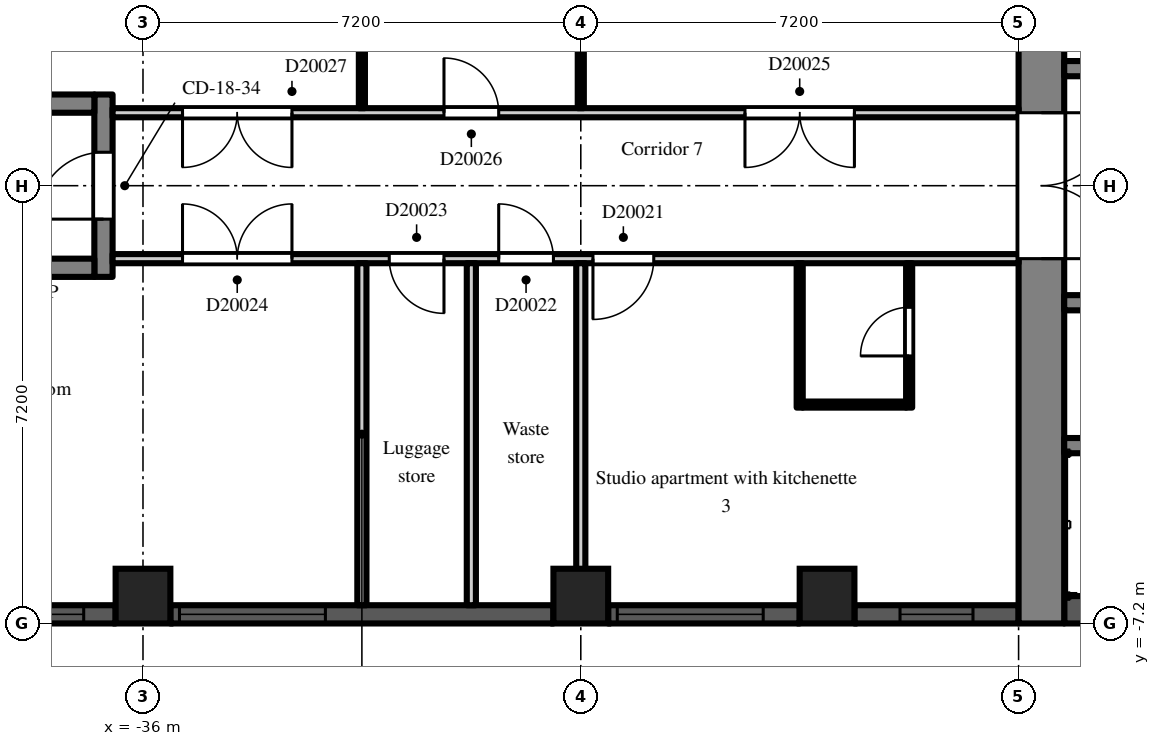
"""IFC4 building model, lengths in metres.
Left out: names, types, materials, properties, quantities, classifications, styles, units other than length and angle.
Written with IfcOpenShell. Run it as: python <this file> out.ifc"""

import sys

from ifc_helpers import new_model, si_unit, direction, frame, frame_2d, origin, origin_2d, place, context, subcontext, project, spatial, rectangle, extrude, element, fill, save


model = new_model("IFC4")
c1 = context("Model", 3, precision=1e-05, world=origin(), true_north=direction((0.0, 1.0)))
c2 = subcontext(c1, "Body", "Model", "MODEL_VIEW")
j1 = project(units=[si_unit("LENGTHUNIT", "METRE"), si_unit("PLANEANGLEUNIT", "RADIAN")], contexts=[c1])
p1 = place(None, origin())
s1 = spatial("IfcSite", under=j1, at=p1, CompositionType="ELEMENT")
p2 = place(p1, origin())
s2 = spatial("IfcBuilding", under=s1, at=p2, CompositionType="ELEMENT")
p3 = place(p2, frame((0.0, 0.0, 138.3)))
s3 = spatial("IfcBuildingStorey", under=s2, at=p3, CompositionType="ELEMENT", Elevation=138.3)
for number, where, z_axis, x_axis in (
    (1, (-36.0, -6.75, 0.0), (0.0, 0.0, 1.0), (1.0, 0.0, 0.0)),
    (2, (-28.8, -6.75, 0.0), (0.0, 0.0, 1.0), (1.0, 0.0, 0.0)),
    (3, (-24.75, -6.75, 0.0), (0.0, 0.0, 1.0), (1.0, 0.0, 0.0)),
):
    element("IfcColumn", number, at=place(p3, frame(where, z_axis=z_axis, x_axis=x_axis)), inside=s3, PredefinedType="COLUMN", context=c2, shape_type="SweptSolid", body=[
        extrude(rectangle(XDim=0.9, YDim=0.9, at=origin_2d()), origin(), (0.0, 0.0, 1.0), 3.0),
    ])
p4 = place(p3, frame((-38.7, -7.05, 0.0), z_axis=(0.0, 0.0, 1.0), x_axis=(1.0, 0.0, 0.0)))
e4 = element("IfcWall", 4, at=p4, inside=s3, PredefinedType="SOLIDWALL", context=c2, shape_type="SweptSolid", body=[
    extrude(rectangle(XDim=2.25, YDim=0.3, at=frame_2d((1.125, 0.0))), origin(), (0.0, 0.0, 1.0), 2.2),
])
p5 = place(p4, frame((0.525, 0.0, 0.2)))
e5 = element("IfcOpeningElement", 5, at=p5, cuts=e4, PredefinedType="OPENING", context=c2, shape_type="SweptSolid", body=[
    extrude(rectangle(XDim=1.2, YDim=1.85, at=frame_2d((0.6, 0.925))), frame((0.0, 0.16, 0.0), z_axis=(0.0, -1.0, 0.0), x_axis=(1.0, 0.0, 0.0)), (0.0, 0.0, 1.0), 0.32),
])
p6 = place(p3, frame((-35.55, -7.05, 0.0), z_axis=(0.0, 0.0, 1.0), x_axis=(1.0, 0.0, 0.0)))
e6 = element("IfcWall", 6, at=p6, inside=s3, PredefinedType="SOLIDWALL", context=c2, shape_type="SweptSolid", body=[
    extrude(rectangle(XDim=6.3, YDim=0.3, at=frame_2d((3.15, 0.0))), origin(), (0.0, 0.0, 1.0), 2.2),
])
p7 = place(p6, frame((0.15, 0.0, 0.2)))
e7 = element("IfcOpeningElement", 7, at=p7, cuts=e6, PredefinedType="OPENING", context=c2, shape_type="SweptSolid", body=[
    extrude(rectangle(XDim=2.4, YDim=1.85, at=frame_2d((1.2, 0.925))), frame((0.0, 0.16, 0.0), z_axis=(0.0, -1.0, 0.0), x_axis=(1.0, 0.0, 0.0)), (0.0, 0.0, 1.0), 0.32),
])
p8 = place(p3, frame((-28.35, -7.05, 0.0), z_axis=(0.0, 0.0, 1.0), x_axis=(1.0, 0.0, 0.0)))
e8 = element("IfcWall", 8, at=p8, inside=s3, PredefinedType="SOLIDWALL", context=c2, shape_type="SweptSolid", body=[
    extrude(rectangle(XDim=3.15, YDim=0.3, at=frame_2d((1.575, 0.0))), origin(), (0.0, 0.0, 1.0), 2.2),
])
p9 = place(p8, frame((0.15, 0.0, 0.2)))
e9 = element("IfcOpeningElement", 9, at=p9, cuts=e8, PredefinedType="OPENING", context=c2, shape_type="SweptSolid", body=[
    extrude(rectangle(XDim=2.4, YDim=1.85, at=frame_2d((1.2, 0.925))), frame((0.0, 0.16, 0.0), z_axis=(0.0, -1.0, 0.0), x_axis=(1.0, 0.0, 0.0)), (0.0, 0.0, 1.0), 0.32),
])
p10 = place(p3, frame((-24.3, -7.05, 0.0), z_axis=(0.0, 0.0, 1.0), x_axis=(1.0, 0.0, 0.0)))
e10 = element("IfcWall", 10, at=p10, inside=s3, PredefinedType="SOLIDWALL", context=c2, shape_type="SweptSolid", body=[
    extrude(rectangle(XDim=2.7, YDim=0.3, at=frame_2d((1.35, 0.0))), origin(), (0.0, 0.0, 1.0), 2.2),
])
p11 = place(p10, frame((0.75, 0.0, 0.2)))
e11 = element("IfcOpeningElement", 11, at=p11, cuts=e10, PredefinedType="OPENING", context=c2, shape_type="SweptSolid", body=[
    extrude(rectangle(XDim=1.2, YDim=1.85, at=frame_2d((0.6, 0.925))), frame((0.0, 0.16, 0.0), z_axis=(0.0, -1.0, 0.0), x_axis=(1.0, 0.0, 0.0)), (0.0, 0.0, 1.0), 0.32),
])
p12 = place(p3, frame((-21.225, -7.2, 0.0), z_axis=(0.0, 0.0, 1.0), x_axis=(0.0, 1.0, 0.0)))
e12 = element("IfcWall", 12, at=p12, inside=s3, PredefinedType="SHEAR", context=c2, shape_type="SweptSolid", body=[
    extrude(rectangle(XDim=14.4, YDim=0.75, at=frame_2d((7.2, 0.0))), origin(), (0.0, 0.0, 1.0), 2.6),
])
p13 = place(p12, frame((6.0, 0.0, 0.0)))
e13 = element("IfcOpeningElement", 13, at=p13, cuts=e12, PredefinedType="OPENING", context=c2, shape_type="SweptSolid", body=[
    extrude(rectangle(XDim=2.4, YDim=2.2, at=frame_2d((1.2, 1.1))), frame((0.0, 0.385, 0.0), z_axis=(0.0, -1.0, 0.0), x_axis=(1.0, 0.0, 0.0)), (0.0, 0.0, 1.0), 0.77),
])
p14 = place(p3, frame((-7.9, 1.925, 0.0), z_axis=(0.0, 0.0, 1.0), x_axis=(-1.0, 0.0, 0.0)))
e14 = element("IfcWall", 14, at=p14, inside=s3, PredefinedType="SHEAR", context=c2, shape_type="SweptSolid", body=[
    extrude(rectangle(XDim=12.95, YDim=0.25, at=frame_2d((6.475, 0.0))), origin(), (0.0, 0.0, 1.0), 2.6),
])
p15 = place(p14, frame((4.825, 0.0, 0.0)))
e15 = element("IfcOpeningElement", 15, at=p15, cuts=e14, PredefinedType="OPENING", context=c2, shape_type="SweptSolid", body=[
    extrude(rectangle(XDim=1.1, YDim=2.1, at=frame_2d((0.55, 1.05))), frame((0.0, 0.135, 0.0), z_axis=(0.0, -1.0, 0.0), x_axis=(1.0, 0.0, 0.0)), (0.0, 0.0, 1.0), 0.27),
])
p16 = place(p14, frame((7.025, 0.0, 0.0)))
e16 = element("IfcOpeningElement", 16, at=p16, cuts=e14, PredefinedType="OPENING", context=c2, shape_type="SweptSolid", body=[
    extrude(rectangle(XDim=1.1, YDim=2.1, at=frame_2d((0.55, 1.05))), frame((0.0, 0.135, 0.0), z_axis=(0.0, -1.0, 0.0), x_axis=(1.0, 0.0, 0.0)), (0.0, 0.0, 1.0), 0.27),
])
p17 = place(p14, frame((9.225, 0.0, 0.0)))
e17 = element("IfcOpeningElement", 17, at=p17, cuts=e14, PredefinedType="OPENING", context=c2, shape_type="SweptSolid", body=[
    extrude(rectangle(XDim=1.1, YDim=2.1, at=frame_2d((0.55, 1.05))), frame((0.0, 0.135, 0.0), z_axis=(0.0, -1.0, 0.0), x_axis=(1.0, 0.0, 0.0)), (0.0, 0.0, 1.0), 0.27),
])
p18 = place(p14, frame((0.525, 0.0, 0.0)))
e18 = element("IfcOpeningElement", 18, at=p18, cuts=e14, PredefinedType="OPENING", context=c2, shape_type="SweptSolid", body=[
    extrude(rectangle(XDim=0.9, YDim=2.1, at=frame_2d((0.45, 1.05))), frame((0.0, 0.135, 0.0), z_axis=(0.0, -1.0, 0.0), x_axis=(1.0, 0.0, 0.0)), (0.0, 0.0, 1.0), 0.27),
])
p19 = place(p14, frame((2.625, 0.0, 0.0)))
e19 = element("IfcOpeningElement", 19, at=p19, cuts=e14, PredefinedType="OPENING", context=c2, shape_type="SweptSolid", body=[
    extrude(rectangle(XDim=1.1, YDim=2.1, at=frame_2d((0.55, 1.05))), frame((0.0, 0.135, 0.0), z_axis=(0.0, -1.0, 0.0), x_axis=(1.0, 0.0, 0.0)), (0.0, 0.0, 1.0), 0.27),
])
p20 = place(p14, frame((11.525, 0.0, 0.0)))
e20 = element("IfcOpeningElement", 20, at=p20, cuts=e14, PredefinedType="OPENING", context=c2, shape_type="SweptSolid", body=[
    extrude(rectangle(XDim=0.9, YDim=2.1, at=frame_2d((0.45, 1.05))), frame((0.0, 0.135, 0.0), z_axis=(0.0, -1.0, 0.0), x_axis=(1.0, 0.0, 0.0)), (0.0, 0.0, 1.0), 0.27),
])
p21 = place(p3, frame((-7.9, -6.975, 0.0), z_axis=(0.0, 0.0, 1.0), x_axis=(-1.0, 0.0, 0.0)))
e21 = element("IfcWall", 21, at=p21, inside=s3, PredefinedType="SHEAR", context=c2, shape_type="SweptSolid", body=[
    extrude(rectangle(XDim=12.95, YDim=0.45, at=frame_2d((6.475, 0.0))), origin(), (0.0, 0.0, 1.0), 2.6),
])
p22 = place(p3, frame((-7.9, -1.925, 0.0), z_axis=(0.0, 0.0, 1.0), x_axis=(-1.0, 0.0, 0.0)))
e22 = element("IfcWall", 22, at=p22, inside=s3, PredefinedType="SHEAR", context=c2, shape_type="SweptSolid", body=[
    extrude(rectangle(XDim=12.95, YDim=0.25, at=frame_2d((6.475, 0.0))), origin(), (0.0, 0.0, 1.0), 2.6),
])
p23 = place(p22, frame((0.525, 0.0, 0.0)))
e23 = element("IfcOpeningElement", 23, at=p23, cuts=e22, PredefinedType="OPENING", context=c2, shape_type="SweptSolid", body=[
    extrude(rectangle(XDim=0.9, YDim=2.1, at=frame_2d((0.45, 1.05))), frame((0.0, 0.135, 0.0), z_axis=(0.0, -1.0, 0.0), x_axis=(1.0, 0.0, 0.0)), (0.0, 0.0, 1.0), 0.27),
])
p24 = place(p22, frame((2.625, 0.0, 0.0)))
e24 = element("IfcOpeningElement", 24, at=p24, cuts=e22, PredefinedType="OPENING", context=c2, shape_type="SweptSolid", body=[
    extrude(rectangle(XDim=1.1, YDim=2.1, at=frame_2d((0.55, 1.05))), frame((0.0, 0.135, 0.0), z_axis=(0.0, -1.0, 0.0), x_axis=(1.0, 0.0, 0.0)), (0.0, 0.0, 1.0), 0.27),
])
p25 = place(p22, frame((6.025, 0.0, 0.0)))
e25 = element("IfcOpeningElement", 25, at=p25, cuts=e22, PredefinedType="OPENING", context=c2, shape_type="SweptSolid", body=[
    extrude(rectangle(XDim=0.9, YDim=2.1, at=frame_2d((0.45, 1.05))), frame((0.0, 0.135, 0.0), z_axis=(0.0, -1.0, 0.0), x_axis=(1.0, 0.0, 0.0)), (0.0, 0.0, 1.0), 0.27),
])
p26 = place(p22, frame((10.425, 0.0, 0.0)))
e26 = element("IfcOpeningElement", 26, at=p26, cuts=e22, PredefinedType="OPENING", context=c2, shape_type="SweptSolid", body=[
    extrude(rectangle(XDim=0.9, YDim=2.1, at=frame_2d((0.45, 1.05))), frame((0.0, 0.135, 0.0), z_axis=(0.0, -1.0, 0.0), x_axis=(1.0, 0.0, 0.0)), (0.0, 0.0, 1.0), 0.27),
])
p27 = place(p3, frame((-12.3, -4.275, 0.0), z_axis=(0.0, 0.0, 1.0), x_axis=(-1.0, 0.0, 0.0)))
e27 = element("IfcWall", 27, at=p27, inside=s3, PredefinedType="SHEAR", context=c2, shape_type="SweptSolid", body=[
    extrude(rectangle(XDim=8.55, YDim=0.25, at=frame_2d((4.275, 0.0))), origin(), (0.0, 0.0, 1.0), 2.6),
])
p28 = place(p3, frame((-36.65, -1.5, 0.0), z_axis=(0.0, 0.0, 1.0), x_axis=(0.0, 1.0, 0.0)))
e28 = element("IfcWall", 28, at=p28, inside=s3, PredefinedType="SHEAR", context=c2, shape_type="SweptSolid", body=[
    extrude(rectangle(XDim=3.0, YDim=0.3, at=frame_2d((1.5, 0.0))), origin(), (0.0, 0.0, 1.0), 2.6),
])
p29 = place(p28, frame((0.95, 0.0, 0.0)))
e29 = element("IfcOpeningElement", 29, at=p29, cuts=e28, PredefinedType="OPENING", context=c2, shape_type="SweptSolid", body=[
    extrude(rectangle(XDim=1.1, YDim=2.1, at=frame_2d((0.55, 1.05))), frame((0.0, 0.16, 0.0), z_axis=(0.0, -1.0, 0.0), x_axis=(1.0, 0.0, 0.0)), (0.0, 0.0, 1.0), 0.32),
])
for number, where, z_axis, x_axis in (
    (30, (-36.8, -1.35, 0.0), (0.0, 0.0, 1.0), (-1.0, 0.0, 0.0)),
    (31, (-36.8, 1.35, 0.0), (0.0, 0.0, 1.0), (-1.0, 0.0, 0.0)),
):
    element("IfcWall", number, at=place(p3, frame(where, z_axis=z_axis, x_axis=x_axis)), inside=s3, PredefinedType="SHEAR", context=c2, shape_type="SweptSolid", body=[
        extrude(rectangle(XDim=5.8, YDim=0.3, at=frame_2d((2.9, 0.0))), origin(), (0.0, 0.0, 1.0), 2.6),
    ])
p30 = place(p3, frame((-36.5, -1.2, 0.0), z_axis=(0.0, 0.0, 1.0), x_axis=(1.0, 0.0, 0.0)))
e32 = element("IfcWall", 32, at=p30, inside=s3, PredefinedType="PARTITIONING", context=c2, shape_type="SweptSolid", body=[
    extrude(rectangle(XDim=14.9, YDim=0.15, at=frame_2d((7.45, 0.0))), origin(), (0.0, 0.0, 1.0), 2.6),
])
p31 = place(p30, frame((7.9, 0.0, 0.0)))
e33 = element("IfcOpeningElement", 33, at=p31, cuts=e32, PredefinedType="OPENING", context=c2, shape_type="SweptSolid", body=[
    extrude(rectangle(XDim=1.0, YDim=2.1, at=frame_2d((0.5, 1.05))), frame((0.0, 0.085, 0.0), z_axis=(0.0, -1.0, 0.0), x_axis=(1.0, 0.0, 0.0)), (0.0, 0.0, 1.0), 0.17),
])
p32 = place(p30, frame((6.35, 0.0, 0.0)))
e34 = element("IfcOpeningElement", 34, at=p32, cuts=e32, PredefinedType="OPENING", context=c2, shape_type="SweptSolid", body=[
    extrude(rectangle(XDim=0.9, YDim=2.1, at=frame_2d((0.45, 1.05))), frame((0.0, 0.085, 0.0), z_axis=(0.0, -1.0, 0.0), x_axis=(1.0, 0.0, 0.0)), (0.0, 0.0, 1.0), 0.17),
])
p33 = place(p30, frame((4.55, 0.0, 0.0)))
e35 = element("IfcOpeningElement", 35, at=p33, cuts=e32, PredefinedType="OPENING", context=c2, shape_type="SweptSolid", body=[
    extrude(rectangle(XDim=0.9, YDim=2.1, at=frame_2d((0.45, 1.05))), frame((0.0, 0.085, 0.0), z_axis=(0.0, -1.0, 0.0), x_axis=(1.0, 0.0, 0.0)), (0.0, 0.0, 1.0), 0.17),
])
p34 = place(p30, frame((1.15, 0.0, 0.0)))
e36 = element("IfcOpeningElement", 36, at=p34, cuts=e32, PredefinedType="OPENING", context=c2, shape_type="SweptSolid", body=[
    extrude(rectangle(XDim=1.8, YDim=2.1, at=frame_2d((0.9, 1.05))), frame((0.0, 0.085, 0.0), z_axis=(0.0, -1.0, 0.0), x_axis=(1.0, 0.0, 0.0)), (0.0, 0.0, 1.0), 0.17),
])
p35 = place(p3, frame((-36.5, 1.2, 0.0), z_axis=(0.0, 0.0, 1.0), x_axis=(1.0, 0.0, 0.0)))
e37 = element("IfcWall", 37, at=p35, inside=s3, PredefinedType="PARTITIONING", context=c2, shape_type="SweptSolid", body=[
    extrude(rectangle(XDim=14.9, YDim=0.15, at=frame_2d((7.45, 0.0))), origin(), (0.0, 0.0, 1.0), 2.6),
])
p36 = place(p35, frame((10.4, 0.0, 0.0)))
e38 = element("IfcOpeningElement", 38, at=p36, cuts=e37, PredefinedType="OPENING", context=c2, shape_type="SweptSolid", body=[
    extrude(rectangle(XDim=1.8, YDim=2.1, at=frame_2d((0.9, 1.05))), frame((0.0, 0.085, 0.0), z_axis=(0.0, -1.0, 0.0), x_axis=(1.0, 0.0, 0.0)), (0.0, 0.0, 1.0), 0.17),
])
p37 = place(p35, frame((5.45, 0.0, 0.0)))
e39 = element("IfcOpeningElement", 39, at=p37, cuts=e37, PredefinedType="OPENING", context=c2, shape_type="SweptSolid", body=[
    extrude(rectangle(XDim=0.9, YDim=2.1, at=frame_2d((0.45, 1.05))), frame((0.0, 0.085, 0.0), z_axis=(0.0, -1.0, 0.0), x_axis=(1.0, 0.0, 0.0)), (0.0, 0.0, 1.0), 0.17),
])
p38 = place(p35, frame((1.15, 0.0, 0.0)))
e40 = element("IfcOpeningElement", 40, at=p38, cuts=e37, PredefinedType="OPENING", context=c2, shape_type="SweptSolid", body=[
    extrude(rectangle(XDim=1.8, YDim=2.1, at=frame_2d((0.9, 1.05))), frame((0.0, 0.085, 0.0), z_axis=(0.0, -1.0, 0.0), x_axis=(1.0, 0.0, 0.0)), (0.0, 0.0, 1.0), 0.17),
])
p39 = place(p3, frame((-32.4, -6.9, 0.0), z_axis=(0.0, 0.0, 1.0), x_axis=(0.0, 1.0, 0.0)))
e41 = element("IfcWall", 41, at=p39, inside=s3, PredefinedType="PARTITIONING", context=c2, shape_type="SweptSolid", body=[
    extrude(rectangle(XDim=5.625, YDim=0.15, at=frame_2d((2.812, 0.0))), origin(), (0.0, 0.0, 1.0), 2.6),
])
p40 = place(p3, frame((-32.4, 1.275, 0.0), z_axis=(0.0, 0.0, 1.0), x_axis=(0.0, 1.0, 0.0)))
e42 = element("IfcWall", 42, at=p40, inside=s3, PredefinedType="PARTITIONING", context=c2, shape_type="SweptSolid", body=[
    extrude(rectangle(XDim=5.625, YDim=0.1, at=frame_2d((2.812, 0.0))), origin(), (0.0, 0.0, 1.0), 2.6),
])
for number, where, z_axis, x_axis in (
    (43, (-30.6, -6.9, 0.0), (0.0, 0.0, 1.0), (0.0, 1.0, 0.0)),
    (44, (-28.8, -6.9, 0.0), (0.0, 0.0, 1.0), (0.0, 1.0, 0.0)),
):
    element("IfcWall", number, at=place(p3, frame(where, z_axis=z_axis, x_axis=x_axis)), inside=s3, PredefinedType="PARTITIONING", context=c2, shape_type="SweptSolid", body=[
        extrude(rectangle(XDim=5.625, YDim=0.15, at=frame_2d((2.812, 0.0))), origin(), (0.0, 0.0, 1.0), 2.6),
    ])
p41 = place(p3, frame((-28.8, 1.275, 0.0), z_axis=(0.0, 0.0, 1.0), x_axis=(0.0, 1.0, 0.0)))
e45 = element("IfcWall", 45, at=p41, inside=s3, PredefinedType="PARTITIONING", context=c2, shape_type="SweptSolid", body=[
    extrude(rectangle(XDim=5.625, YDim=0.1, at=frame_2d((2.812, 0.0))), origin(), (0.0, 0.0, 1.0), 2.6),
])
p42 = place(p3, frame((-25.2, -3.65, 0.0), z_axis=(0.0, 0.0, 1.0), x_axis=(0.0, 1.0, 0.0)))
e46 = element("IfcWall", 46, at=p42, inside=s3, PredefinedType="PARTITIONING", context=c2, shape_type="SweptSolid", body=[
    extrude(rectangle(XDim=2.375, YDim=0.1, at=frame_2d((1.188, 0.0))), origin(), (0.0, 0.0, 1.0), 2.6),
])
p43 = place(p3, frame((-25.15, -3.6, 0.0), z_axis=(0.0, 0.0, 1.0), x_axis=(1.0, 0.0, 0.0)))
e47 = element("IfcWall", 47, at=p43, inside=s3, PredefinedType="PARTITIONING", context=c2, shape_type="SweptSolid", body=[
    extrude(rectangle(XDim=1.7, YDim=0.1, at=frame_2d((0.85, 0.0))), origin(), (0.0, 0.0, 1.0), 2.6),
])
p44 = place(p3, frame((-23.4, -3.65, 0.0), z_axis=(0.0, 0.0, 1.0), x_axis=(0.0, 1.0, 0.0)))
e48 = element("IfcWall", 48, at=p44, inside=s3, PredefinedType="PARTITIONING", context=c2, shape_type="SweptSolid", body=[
    extrude(rectangle(XDim=2.375, YDim=0.1, at=frame_2d((1.188, 0.0))), origin(), (0.0, 0.0, 1.0), 2.6),
])
p45 = place(p44, frame((0.85, 0.0, 0.0)))
e49 = element("IfcOpeningElement", 49, at=p45, cuts=e48, PredefinedType="OPENING", context=c2, shape_type="SweptSolid", body=[
    extrude(rectangle(XDim=0.8, YDim=2.1, at=frame_2d((0.4, 1.05))), frame((0.0, 0.06, 0.0), z_axis=(0.0, -1.0, 0.0), x_axis=(1.0, 0.0, 0.0)), (0.0, 0.0, 1.0), 0.12),
])
p46 = place(p5, origin())
e50 = element("IfcWindow", 50, at=p46, inside=s3, PartitioningType="SINGLE_PANEL", PredefinedType="WINDOW", context=c2, shape_type="SweptSolid", body=[
    extrude(rectangle(XDim=1.2, YDim=1.85, at=frame_2d((0.6, 0.925))), frame((0.0, 0.03, 0.0), z_axis=(0.0, -1.0, 0.0), x_axis=(1.0, 0.0, 0.0)), (0.0, 0.0, 1.0), 0.06),
])
fill(e5, e50)
p47 = place(p7, origin())
e51 = element("IfcWindow", 51, at=p47, inside=s3, PartitioningType="SINGLE_PANEL", PredefinedType="WINDOW", context=c2, shape_type="SweptSolid", body=[
    extrude(rectangle(XDim=2.4, YDim=1.85, at=frame_2d((1.2, 0.925))), frame((0.0, 0.03, 0.0), z_axis=(0.0, -1.0, 0.0), x_axis=(1.0, 0.0, 0.0)), (0.0, 0.0, 1.0), 0.06),
])
fill(e7, e51)
p48 = place(p9, origin())
e52 = element("IfcWindow", 52, at=p48, inside=s3, PartitioningType="SINGLE_PANEL", PredefinedType="WINDOW", context=c2, shape_type="SweptSolid", body=[
    extrude(rectangle(XDim=2.4, YDim=1.85, at=frame_2d((1.2, 0.925))), frame((0.0, 0.03, 0.0), z_axis=(0.0, -1.0, 0.0), x_axis=(1.0, 0.0, 0.0)), (0.0, 0.0, 1.0), 0.06),
])
fill(e9, e52)
p49 = place(p11, origin())
e53 = element("IfcWindow", 53, at=p49, inside=s3, PartitioningType="SINGLE_PANEL", PredefinedType="WINDOW", context=c2, shape_type="SweptSolid", body=[
    extrude(rectangle(XDim=1.2, YDim=1.85, at=frame_2d((0.6, 0.925))), frame((0.0, 0.03, 0.0), z_axis=(0.0, -1.0, 0.0), x_axis=(1.0, 0.0, 0.0)), (0.0, 0.0, 1.0), 0.06),
])
fill(e11, e53)
p50 = place(p13, frame((2.4, 0.0, 0.0), z_axis=(0.0, 0.0, 1.0), x_axis=(-1.0, 0.0, 0.0)))
e54 = element("IfcDoor", 54, at=p50, inside=s3, OperationType="DOUBLE_DOOR_DOUBLE_SWING", PredefinedType="DOOR", context=c2, shape_type="SweptSolid", body=[
    extrude(rectangle(XDim=2.4, YDim=2.2, at=frame_2d((1.2, 1.1))), frame((0.0, 0.025, 0.0), z_axis=(0.0, -1.0, 0.0), x_axis=(1.0, 0.0, 0.0)), (0.0, 0.0, 1.0), 0.05),
])
fill(e13, e54)
p51 = place(p29, origin())
e55 = element("IfcDoor", 55, at=p51, inside=s3, OperationType="SINGLE_SWING_LEFT", PredefinedType="DOOR", context=c2, shape_type="SweptSolid", body=[
    extrude(rectangle(XDim=1.1, YDim=2.1, at=frame_2d((0.55, 1.05))), frame((0.0, 0.025, 0.0), z_axis=(0.0, -1.0, 0.0), x_axis=(1.0, 0.0, 0.0)), (0.0, 0.0, 1.0), 0.05),
])
fill(e29, e55)
p52 = place(p45, origin())
e56 = element("IfcDoor", 56, at=p52, inside=s3, OperationType="SINGLE_SWING_LEFT", PredefinedType="DOOR", context=c2, shape_type="SweptSolid", body=[
    extrude(rectangle(XDim=0.8, YDim=2.1, at=frame_2d((0.4, 1.05))), frame((0.0, 0.025, 0.0), z_axis=(0.0, -1.0, 0.0), x_axis=(1.0, 0.0, 0.0)), (0.0, 0.0, 1.0), 0.05),
])
fill(e49, e56)
p53 = place(p31, frame((1.0, 0.0, 0.0), z_axis=(0.0, 0.0, 1.0), x_axis=(-1.0, 0.0, 0.0)))
e57 = element("IfcDoor", 57, at=p53, inside=s3, OperationType="SINGLE_SWING_RIGHT", PredefinedType="DOOR", context=c2, shape_type="SweptSolid", body=[
    extrude(rectangle(XDim=1.0, YDim=2.1, at=frame_2d((0.5, 1.05))), frame((0.0, 0.025, 0.0), z_axis=(0.0, -1.0, 0.0), x_axis=(1.0, 0.0, 0.0)), (0.0, 0.0, 1.0), 0.05),
])
fill(e33, e57)
p54 = place(p32, origin())
e58 = element("IfcDoor", 58, at=p54, inside=s3, OperationType="SINGLE_SWING_LEFT", PredefinedType="DOOR", context=c2, shape_type="SweptSolid", body=[
    extrude(rectangle(XDim=0.9, YDim=2.1, at=frame_2d((0.45, 1.05))), frame((0.0, 0.025, 0.0), z_axis=(0.0, -1.0, 0.0), x_axis=(1.0, 0.0, 0.0)), (0.0, 0.0, 1.0), 0.05),
])
fill(e34, e58)
p55 = place(p33, frame((0.9, 0.0, 0.0), z_axis=(0.0, 0.0, 1.0), x_axis=(-1.0, 0.0, 0.0)))
e59 = element("IfcDoor", 59, at=p55, inside=s3, OperationType="SINGLE_SWING_LEFT", PredefinedType="DOOR", context=c2, shape_type="SweptSolid", body=[
    extrude(rectangle(XDim=0.9, YDim=2.1, at=frame_2d((0.45, 1.05))), frame((0.0, 0.025, 0.0), z_axis=(0.0, -1.0, 0.0), x_axis=(1.0, 0.0, 0.0)), (0.0, 0.0, 1.0), 0.05),
])
fill(e35, e59)
p56 = place(p34, origin())
e60 = element("IfcDoor", 60, at=p56, inside=s3, OperationType="DOUBLE_DOOR_DOUBLE_SWING", PredefinedType="DOOR", context=c2, shape_type="SweptSolid", body=[
    extrude(rectangle(XDim=1.8, YDim=2.1, at=frame_2d((0.9, 1.05))), frame((0.0, 0.025, 0.0), z_axis=(0.0, -1.0, 0.0), x_axis=(1.0, 0.0, 0.0)), (0.0, 0.0, 1.0), 0.05),
])
fill(e36, e60)
p57 = place(p36, frame((1.8, 0.0, 0.0), z_axis=(0.0, 0.0, 1.0), x_axis=(-1.0, 0.0, 0.0)))
e61 = element("IfcDoor", 61, at=p57, inside=s3, OperationType="DOUBLE_DOOR_DOUBLE_SWING", PredefinedType="DOOR", context=c2, shape_type="SweptSolid", body=[
    extrude(rectangle(XDim=1.8, YDim=2.1, at=frame_2d((0.9, 1.05))), frame((0.0, 0.025, 0.0), z_axis=(0.0, -1.0, 0.0), x_axis=(1.0, 0.0, 0.0)), (0.0, 0.0, 1.0), 0.05),
])
fill(e38, e61)
p58 = place(p37, origin())
e62 = element("IfcDoor", 62, at=p58, inside=s3, OperationType="SINGLE_SWING_LEFT", PredefinedType="DOOR", context=c2, shape_type="SweptSolid", body=[
    extrude(rectangle(XDim=0.9, YDim=2.1, at=frame_2d((0.45, 1.05))), frame((0.0, 0.025, 0.0), z_axis=(0.0, -1.0, 0.0), x_axis=(1.0, 0.0, 0.0)), (0.0, 0.0, 1.0), 0.05),
])
fill(e39, e62)
p59 = place(p38, frame((1.8, 0.0, 0.0), z_axis=(0.0, 0.0, 1.0), x_axis=(-1.0, 0.0, 0.0)))
e63 = element("IfcDoor", 63, at=p59, inside=s3, OperationType="DOUBLE_DOOR_DOUBLE_SWING", PredefinedType="DOOR", context=c2, shape_type="SweptSolid", body=[
    extrude(rectangle(XDim=1.8, YDim=2.1, at=frame_2d((0.9, 1.05))), frame((0.0, 0.025, 0.0), z_axis=(0.0, -1.0, 0.0), x_axis=(1.0, 0.0, 0.0)), (0.0, 0.0, 1.0), 0.05),
])
fill(e40, e63)
save(model, sys.argv[1])
